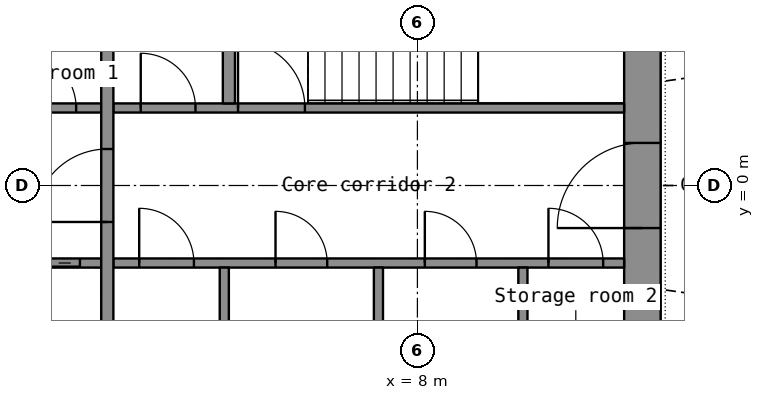
"""IFC4 building model, lengths in metres.
Left out: names, types, materials, properties, quantities, classifications, styles, units other than length and angle.
Written with IfcOpenShell. Run it as: python <this file> out.ifc"""

import sys

from ifc_helpers import new_model, si_unit, direction, frame, frame_2d, origin, place, context, subcontext, project, spatial, rectangle, extrude, element, fill, save


model = new_model("IFC4")
c1 = context("Model", 3, precision=1e-05, world=origin(), true_north=direction((0.0, 1.0)))
c2 = subcontext(c1, "Body", "Model", "MODEL_VIEW")
j1 = project(units=[si_unit("LENGTHUNIT", "METRE"), si_unit("PLANEANGLEUNIT", "RADIAN")], contexts=[c1])
p1 = place(None, origin())
s1 = spatial("IfcSite", under=j1, at=p1, CompositionType="ELEMENT")
p2 = place(p1, origin())
s2 = spatial("IfcBuilding", under=s1, at=p2, CompositionType="ELEMENT")
p3 = place(p2, frame((0.0, 0.0, 81.5)))
s3 = spatial("IfcBuildingStorey", under=s2, at=p3, CompositionType="ELEMENT", Elevation=81.5)
p4 = place(p3, frame((11.7, -7.2, 0.0), z_axis=(0.0, 0.0, 1.0), x_axis=(0.0, 1.0, 0.0)))
e1 = element("IfcWall", 1, at=p4, inside=s3, PredefinedType="SHEAR", context=c2, shape_type="SweptSolid", body=[
    extrude(rectangle(XDim=14.4, YDim=0.6, at=frame_2d((7.2, 0.0))), origin(), (0.0, 0.0, 1.0), 3.3),
])
p5 = place(p4, frame((6.5, 0.0, 0.0)))
e2 = element("IfcOpeningElement", 2, at=p5, cuts=e1, PredefinedType="OPENING", context=c2, shape_type="SweptSolid", body=[
    extrude(rectangle(XDim=1.4, YDim=2.2, at=frame_2d((0.7, 1.1))), frame((0.0, 0.31, 0.0), z_axis=(0.0, -1.0, 0.0), x_axis=(1.0, 0.0, 0.0)), (0.0, 0.0, 1.0), 0.62),
])
p6 = place(p3, frame((-2.8, -1.275, 0.0), z_axis=(0.0, 0.0, 1.0), x_axis=(1.0, 0.0, 0.0)))
e3 = element("IfcWall", 3, at=p6, inside=s3, PredefinedType="SHEAR", context=c2, shape_type="SweptSolid", body=[
    extrude(rectangle(XDim=5.6, YDim=0.15, at=frame_2d((2.8, 0.0))), origin(), (0.0, 0.0, 1.0), 3.3),
])
p7 = place(p6, frame((4.15, 0.0, 0.0)))
e4 = element("IfcOpeningElement", 4, at=p7, cuts=e3, PredefinedType="OPENING", context=c2, shape_type="SweptSolid", body=[
    extrude(rectangle(XDim=1.1, YDim=2.2, at=frame_2d((0.55, 1.1))), frame((0.0, 0.085, 0.0), z_axis=(0.0, -1.0, 0.0), x_axis=(1.0, 0.0, 0.0)), (0.0, 0.0, 1.0), 0.17),
])
p8 = place(p6, frame((0.499, 0.0, 0.0)))
e5 = element("IfcOpeningElement", 5, at=p8, cuts=e3, PredefinedType="OPENING", context=c2, shape_type="SweptSolid", body=[
    extrude(rectangle(XDim=0.9, YDim=2.1, at=frame_2d((0.45, 1.05))), frame((0.0, 0.085, 0.0), z_axis=(0.0, -1.0, 0.0), x_axis=(1.0, 0.0, 0.0)), (0.0, 0.0, 1.0), 0.17),
])
p9 = place(p6, frame((2.374, 0.0, 0.0)))
e6 = element("IfcOpeningElement", 6, at=p9, cuts=e3, PredefinedType="OPENING", context=c2, shape_type="SweptSolid", body=[
    extrude(rectangle(XDim=0.9, YDim=2.1, at=frame_2d((0.45, 1.05))), frame((0.0, 0.085, 0.0), z_axis=(0.0, -1.0, 0.0), x_axis=(1.0, 0.0, 0.0)), (0.0, 0.0, 1.0), 0.17),
])
p10 = place(p3, frame((3.0, -1.275, 0.0), z_axis=(0.0, 0.0, 1.0), x_axis=(1.0, 0.0, 0.0)))
e7 = element("IfcWall", 7, at=p10, inside=s3, PredefinedType="PARTITIONING", context=c2, shape_type="SweptSolid", body=[
    extrude(rectangle(XDim=8.4, YDim=0.15, at=frame_2d((4.2, 0.0))), origin(), (0.0, 0.0, 1.0), 3.3),
])
p11 = place(p10, frame((0.425, 0.0, 0.0)))
e8 = element("IfcOpeningElement", 8, at=p11, cuts=e7, PredefinedType="OPENING", context=c2, shape_type="SweptSolid", body=[
    extrude(rectangle(XDim=0.9, YDim=2.1, at=frame_2d((0.45, 1.05))), frame((0.0, 0.085, 0.0), z_axis=(0.0, -1.0, 0.0), x_axis=(1.0, 0.0, 0.0)), (0.0, 0.0, 1.0), 0.17),
])
p12 = place(p10, frame((2.667, 0.0, 0.0)))
e9 = element("IfcOpeningElement", 9, at=p12, cuts=e7, PredefinedType="OPENING", context=c2, shape_type="SweptSolid", body=[
    extrude(rectangle(XDim=0.85, YDim=2.1, at=frame_2d((0.425, 1.05))), frame((0.0, 0.085, 0.0), z_axis=(0.0, -1.0, 0.0), x_axis=(1.0, 0.0, 0.0)), (0.0, 0.0, 1.0), 0.17),
])
p13 = place(p10, frame((5.122, 0.0, 0.0)))
e10 = element("IfcOpeningElement", 10, at=p13, cuts=e7, PredefinedType="OPENING", context=c2, shape_type="SweptSolid", body=[
    extrude(rectangle(XDim=0.85, YDim=2.1, at=frame_2d((0.425, 1.05))), frame((0.0, 0.085, 0.0), z_axis=(0.0, -1.0, 0.0), x_axis=(1.0, 0.0, 0.0)), (0.0, 0.0, 1.0), 0.17),
])
p14 = place(p10, frame((7.155, 0.0, 0.0)))
e11 = element("IfcOpeningElement", 11, at=p14, cuts=e7, PredefinedType="OPENING", context=c2, shape_type="SweptSolid", body=[
    extrude(rectangle(XDim=0.9, YDim=2.1, at=frame_2d((0.45, 1.05))), frame((0.0, 0.085, 0.0), z_axis=(0.0, -1.0, 0.0), x_axis=(1.0, 0.0, 0.0)), (0.0, 0.0, 1.0), 0.17),
])
p15 = place(p3, frame((-2.8, 1.275, 0.0), z_axis=(0.0, 0.0, 1.0), x_axis=(1.0, 0.0, 0.0)))
e12 = element("IfcWall", 12, at=p15, inside=s3, PredefinedType="SHEAR", context=c2, shape_type="SweptSolid", body=[
    extrude(rectangle(XDim=5.6, YDim=0.15, at=frame_2d((2.8, 0.0))), origin(), (0.0, 0.0, 1.0), 3.3),
])
p16 = place(p15, frame((0.35, 0.0, 0.0)))
e13 = element("IfcOpeningElement", 13, at=p16, cuts=e12, PredefinedType="OPENING", context=c2, shape_type="SweptSolid", body=[
    extrude(rectangle(XDim=1.1, YDim=2.2, at=frame_2d((0.55, 1.1))), frame((0.0, 0.085, 0.0), z_axis=(0.0, -1.0, 0.0), x_axis=(1.0, 0.0, 0.0)), (0.0, 0.0, 1.0), 0.17),
])
p17 = place(p15, frame((2.413, 0.0, 0.0)))
e14 = element("IfcOpeningElement", 14, at=p17, cuts=e12, PredefinedType="OPENING", context=c2, shape_type="SweptSolid", body=[
    extrude(rectangle(XDim=0.9, YDim=2.1, at=frame_2d((0.45, 1.05))), frame((0.0, 0.085, 0.0), z_axis=(0.0, -1.0, 0.0), x_axis=(1.0, 0.0, 0.0)), (0.0, 0.0, 1.0), 0.17),
])
p18 = place(p15, frame((4.288, 0.0, 0.0)))
e15 = element("IfcOpeningElement", 15, at=p18, cuts=e12, PredefinedType="OPENING", context=c2, shape_type="SweptSolid", body=[
    extrude(rectangle(XDim=0.9, YDim=2.1, at=frame_2d((0.45, 1.05))), frame((0.0, 0.085, 0.0), z_axis=(0.0, -1.0, 0.0), x_axis=(1.0, 0.0, 0.0)), (0.0, 0.0, 1.0), 0.17),
])
p19 = place(p3, frame((3.0, 1.275, 0.0), z_axis=(0.0, 0.0, 1.0), x_axis=(1.0, 0.0, 0.0)))
e16 = element("IfcWall", 16, at=p19, inside=s3, PredefinedType="SHEAR", context=c2, shape_type="SweptSolid", body=[
    extrude(rectangle(XDim=8.4, YDim=0.15, at=frame_2d((4.2, 0.0))), origin(), (0.0, 0.0, 1.0), 3.3),
])
p20 = place(p19, frame((2.05, 0.0, 0.0)))
e17 = element("IfcOpeningElement", 17, at=p20, cuts=e16, PredefinedType="OPENING", context=c2, shape_type="SweptSolid", body=[
    extrude(rectangle(XDim=1.1, YDim=2.15, at=frame_2d((0.55, 1.075))), frame((0.0, 0.085, 0.0), z_axis=(0.0, -1.0, 0.0), x_axis=(1.0, 0.0, 0.0)), (0.0, 0.0, 1.0), 0.17),
])
p21 = place(p19, frame((0.45, 0.0, 0.0)))
e18 = element("IfcOpeningElement", 18, at=p21, cuts=e16, PredefinedType="OPENING", context=c2, shape_type="SweptSolid", body=[
    extrude(rectangle(XDim=0.9, YDim=2.1, at=frame_2d((0.45, 1.05))), frame((0.0, 0.085, 0.0), z_axis=(0.0, -1.0, 0.0), x_axis=(1.0, 0.0, 0.0)), (0.0, 0.0, 1.0), 0.17),
])
p22 = place(p3, frame((2.9, -3.7, 0.0), z_axis=(0.0, 0.0, 1.0), x_axis=(0.0, 1.0, 0.0)))
e19 = element("IfcWall", 19, at=p22, inside=s3, PredefinedType="SHEAR", context=c2, shape_type="SweptSolid", body=[
    extrude(rectangle(XDim=7.4, YDim=0.2, at=frame_2d((3.7, 0.0))), origin(), (0.0, 0.0, 1.0), 3.3),
])
p23 = place(p22, frame((3.1, 0.0, 0.0)))
e20 = element("IfcOpeningElement", 20, at=p23, cuts=e19, PredefinedType="OPENING", context=c2, shape_type="SweptSolid", body=[
    extrude(rectangle(XDim=1.2, YDim=2.2, at=frame_2d((0.6, 1.1))), frame((0.0, 0.11, 0.0), z_axis=(0.0, -1.0, 0.0), x_axis=(1.0, 0.0, 0.0)), (0.0, 0.0, 1.0), 0.22),
])
p24 = place(p3, frame((4.9, 1.35, 0.0), z_axis=(0.0, 0.0, 1.0), x_axis=(0.0, 1.0, 0.0)))
e21 = element("IfcWall", 21, at=p24, inside=s3, PredefinedType="SHEAR", context=c2, shape_type="SweptSolid", body=[
    extrude(rectangle(XDim=2.35, YDim=0.2, at=frame_2d((1.175, 0.0))), origin(), (0.0, 0.0, 1.0), 3.3),
])
for number, where, z_axis, x_axis in (
    (22, (4.824, -3.7, 0.0), (0.0, 0.0, 1.0), (0.0, 1.0, 0.0)),
    (23, (7.359, -3.7, 0.0), (0.0, 0.0, 1.0), (0.0, 1.0, 0.0)),
    (24, (9.735, -3.7, 0.0), (0.0, 0.0, 1.0), (0.0, 1.0, 0.0)),
):
    element("IfcWall", number, at=place(p3, frame(where, z_axis=z_axis, x_axis=x_axis)), inside=s3, PredefinedType="PARTITIONING", context=c2, shape_type="SweptSolid", body=[
        extrude(rectangle(XDim=2.35, YDim=0.15, at=frame_2d((1.175, 0.0))), origin(), (0.0, 0.0, 1.0), 3.3),
    ])
p25 = place(p5, origin())
e25 = element("IfcDoor", 25, at=p25, inside=s3, OperationType="DOUBLE_DOOR_SINGLE_SWING", PredefinedType="DOOR", context=c2, shape_type="SweptSolid", body=[
    extrude(rectangle(XDim=1.4, YDim=2.2, at=frame_2d((0.7, 1.1))), frame((0.0, 0.025, 0.0), z_axis=(0.0, -1.0, 0.0), x_axis=(1.0, 0.0, 0.0)), (0.0, 0.0, 1.0), 0.05),
])
fill(e2, e25)
p26 = place(p23, origin())
e26 = element("IfcDoor", 26, at=p26, inside=s3, OperationType="SINGLE_SWING_LEFT", PredefinedType="DOOR", context=c2, shape_type="SweptSolid", body=[
    extrude(rectangle(XDim=1.2, YDim=2.2, at=frame_2d((0.6, 1.1))), frame((0.0, 0.025, 0.0), z_axis=(0.0, -1.0, 0.0), x_axis=(1.0, 0.0, 0.0)), (0.0, 0.0, 1.0), 0.05),
])
fill(e20, e26)
p27 = place(p7, origin())
e27 = element("IfcDoor", 27, at=p27, inside=s3, OperationType="DOUBLE_DOOR_SLIDING", PredefinedType="DOOR", context=c2, shape_type="SweptSolid", body=[
    extrude(rectangle(XDim=1.1, YDim=2.2, at=frame_2d((0.55, 1.1))), frame((0.0, 0.025, 0.0), z_axis=(0.0, -1.0, 0.0), x_axis=(1.0, 0.0, 0.0)), (0.0, 0.0, 1.0), 0.05),
])
fill(e4, e27)
p28 = place(p20, origin())
e28 = element("IfcDoor", 28, at=p28, inside=s3, OperationType="SINGLE_SWING_LEFT", PredefinedType="DOOR", context=c2, shape_type="SweptSolid", body=[
    extrude(rectangle(XDim=1.1, YDim=2.15, at=frame_2d((0.55, 1.075))), frame((0.0, 0.025, 0.0), z_axis=(0.0, -1.0, 0.0), x_axis=(1.0, 0.0, 0.0)), (0.0, 0.0, 1.0), 0.05),
])
fill(e17, e28)
p29 = place(p11, origin())
e29 = element("IfcDoor", 29, at=p29, inside=s3, OperationType="SINGLE_SWING_LEFT", PredefinedType="DOOR", context=c2, shape_type="SweptSolid", body=[
    extrude(rectangle(XDim=0.9, YDim=2.1, at=frame_2d((0.45, 1.05))), frame((0.0, 0.025, 0.0), z_axis=(0.0, -1.0, 0.0), x_axis=(1.0, 0.0, 0.0)), (0.0, 0.0, 1.0), 0.05),
])
fill(e8, e29)
p30 = place(p12, origin())
e30 = element("IfcDoor", 30, at=p30, inside=s3, OperationType="SINGLE_SWING_LEFT", PredefinedType="DOOR", context=c2, shape_type="SweptSolid", body=[
    extrude(rectangle(XDim=0.85, YDim=2.1, at=frame_2d((0.425, 1.05))), frame((0.0, 0.025, 0.0), z_axis=(0.0, -1.0, 0.0), x_axis=(1.0, 0.0, 0.0)), (0.0, 0.0, 1.0), 0.05),
])
fill(e9, e30)
p31 = place(p13, origin())
e31 = element("IfcDoor", 31, at=p31, inside=s3, OperationType="SINGLE_SWING_LEFT", PredefinedType="DOOR", context=c2, shape_type="SweptSolid", body=[
    extrude(rectangle(XDim=0.85, YDim=2.1, at=frame_2d((0.425, 1.05))), frame((0.0, 0.025, 0.0), z_axis=(0.0, -1.0, 0.0), x_axis=(1.0, 0.0, 0.0)), (0.0, 0.0, 1.0), 0.05),
])
fill(e10, e31)
p32 = place(p14, origin())
e32 = element("IfcDoor", 32, at=p32, inside=s3, OperationType="SINGLE_SWING_LEFT", PredefinedType="DOOR", context=c2, shape_type="SweptSolid", body=[
    extrude(rectangle(XDim=0.9, YDim=2.1, at=frame_2d((0.45, 1.05))), frame((0.0, 0.025, 0.0), z_axis=(0.0, -1.0, 0.0), x_axis=(1.0, 0.0, 0.0)), (0.0, 0.0, 1.0), 0.05),
])
fill(e11, e32)
p33 = place(p18, origin())
e33 = element("IfcDoor", 33, at=p33, inside=s3, OperationType="SINGLE_SWING_LEFT", PredefinedType="DOOR", context=c2, shape_type="SweptSolid", body=[
    extrude(rectangle(XDim=0.9, YDim=2.1, at=frame_2d((0.45, 1.05))), frame((0.0, 0.025, 0.0), z_axis=(0.0, -1.0, 0.0), x_axis=(1.0, 0.0, 0.0)), (0.0, 0.0, 1.0), 0.05),
])
fill(e15, e33)
p34 = place(p21, origin())
e34 = element("IfcDoor", 34, at=p34, inside=s3, OperationType="SINGLE_SWING_LEFT", PredefinedType="DOOR", context=c2, shape_type="SweptSolid", body=[
    extrude(rectangle(XDim=0.9, YDim=2.1, at=frame_2d((0.45, 1.05))), frame((0.0, 0.025, 0.0), z_axis=(0.0, -1.0, 0.0), x_axis=(1.0, 0.0, 0.0)), (0.0, 0.0, 1.0), 0.05),
])
fill(e18, e34)
save(model, sys.argv[1])
